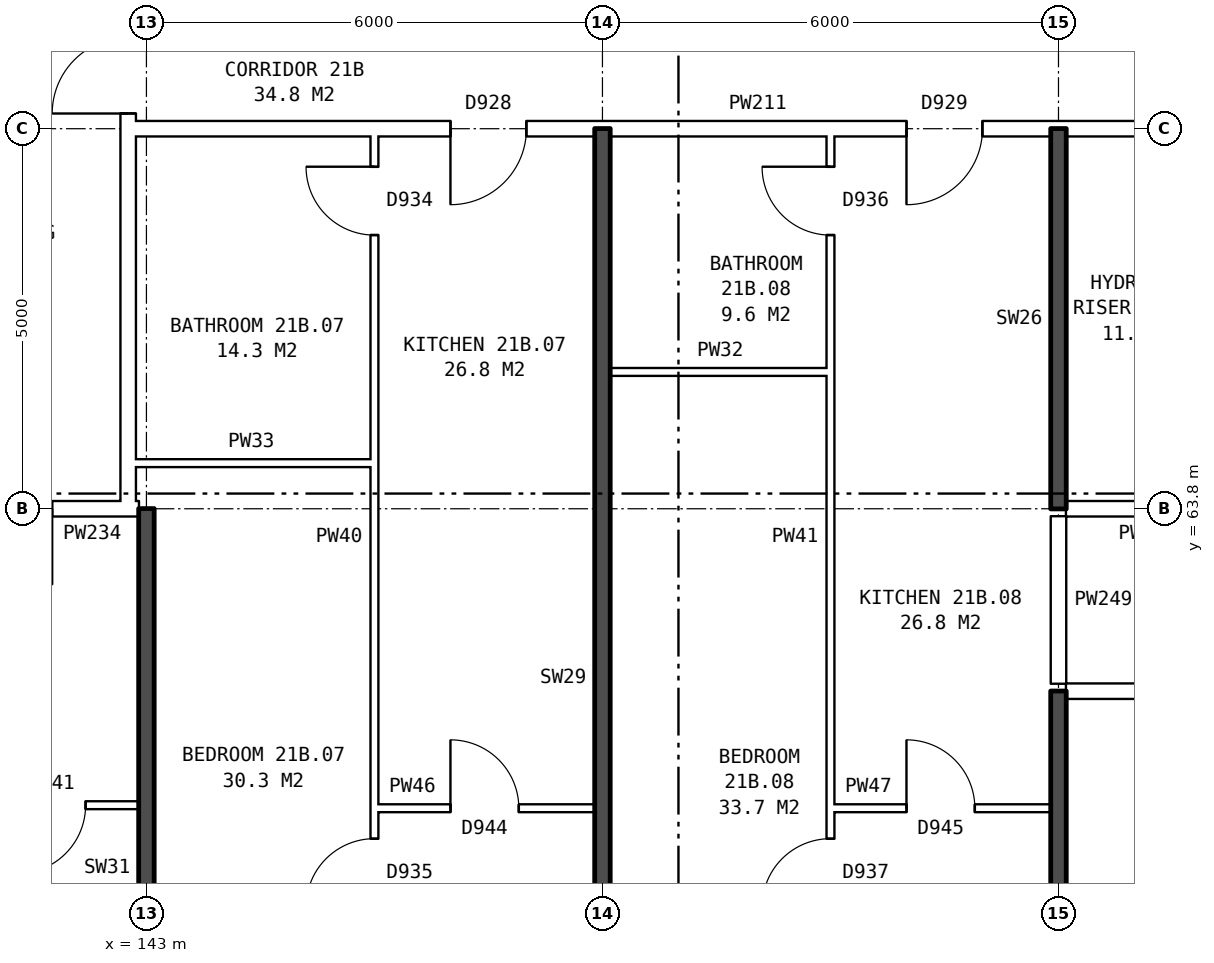
"""IFC4 building model, lengths in metres.
Left out: names, types, materials, properties, quantities, classifications, styles, units other than length and angle.
Written with IfcOpenShell. Run it as: python <this file> out.ifc"""

import sys

from ifc_helpers import new_model, si_unit, direction, frame, frame_2d, origin, place, context, subcontext, project, spatial, rectangle, extrude, element, fill, save


model = new_model("IFC4")
c1 = context("Model", 3, precision=1e-05, world=origin(), true_north=direction((0.0, 1.0)))
c2 = subcontext(c1, "Body", "Model", "MODEL_VIEW")
j1 = project(units=[si_unit("LENGTHUNIT", "METRE"), si_unit("PLANEANGLEUNIT", "RADIAN")], contexts=[c1])
p1 = place(None, origin())
s1 = spatial("IfcSite", under=j1, at=p1, CompositionType="ELEMENT")
p2 = place(p1, origin())
s2 = spatial("IfcBuilding", under=s1, at=p2, CompositionType="ELEMENT")
p3 = place(p2, frame((0.0, 0.0, 77.8)))
s3 = spatial("IfcBuildingStorey", under=s2, at=p3, CompositionType="ELEMENT", Elevation=77.8)
p4 = place(p3, frame((142.76, 63.9, 0.0), z_axis=(0.0, 0.0, 1.0), x_axis=(0.0, 1.0, 0.0)))
e1 = element("IfcWall", 1, at=p4, inside=s3, PredefinedType="PARTITIONING", context=c2, shape_type="SweptSolid", body=[
    extrude(rectangle(XDim=12.2, YDim=0.2, at=frame_2d((6.1, 0.0))), origin(), (0.0, 0.0, 1.0), 2.85),
])
p5 = place(p4, frame((5.1, 0.0, 0.0)))
e2 = element("IfcOpeningElement", 2, at=p5, cuts=e1, PredefinedType="OPENING", context=c2, shape_type="SweptSolid", body=[
    extrude(rectangle(XDim=2.0, YDim=2.1, at=frame_2d((1.0, 1.05))), frame((0.0, 0.11, 0.0), z_axis=(0.0, -1.0, 0.0), x_axis=(1.0, 0.0, 0.0)), (0.0, 0.0, 1.0), 0.22),
])
p6 = place(p3, frame((146.0, 59.86, 0.0), z_axis=(0.0, 0.0, 1.0), x_axis=(1.0, 0.0, 0.0)))
e3 = element("IfcWall", 3, at=p6, inside=s3, PredefinedType="PARTITIONING", context=c2, shape_type="SweptSolid", body=[
    extrude(rectangle(XDim=2.9, YDim=0.1, at=frame_2d((1.45, 0.0))), origin(), (0.0, 0.0, 1.0), 2.85),
])
p7 = place(p6, frame((1.0, 0.0, 0.0)))
e4 = element("IfcOpeningElement", 4, at=p7, cuts=e3, PredefinedType="OPENING", context=c2, shape_type="SweptSolid", body=[
    extrude(rectangle(XDim=0.9, YDim=2.1, at=frame_2d((0.45, 1.05))), frame((0.0, 0.06, 0.0), z_axis=(0.0, -1.0, 0.0), x_axis=(1.0, 0.0, 0.0)), (0.0, 0.0, 1.0), 0.12),
])
p8 = place(p3, frame((152.0, 59.86, 0.0), z_axis=(0.0, 0.0, 1.0), x_axis=(1.0, 0.0, 0.0)))
e5 = element("IfcWall", 5, at=p8, inside=s3, PredefinedType="PARTITIONING", context=c2, shape_type="SweptSolid", body=[
    extrude(rectangle(XDim=2.9, YDim=0.1, at=frame_2d((1.45, 0.0))), origin(), (0.0, 0.0, 1.0), 2.85),
])
p9 = place(p8, frame((1.0, 0.0, 0.0)))
e6 = element("IfcOpeningElement", 6, at=p9, cuts=e5, PredefinedType="OPENING", context=c2, shape_type="SweptSolid", body=[
    extrude(rectangle(XDim=0.9, YDim=2.1, at=frame_2d((0.45, 1.05))), frame((0.0, 0.06, 0.0), z_axis=(0.0, -1.0, 0.0), x_axis=(1.0, 0.0, 0.0)), (0.0, 0.0, 1.0), 0.12),
])
p10 = place(p3, frame((137.1, 59.9, 0.0), z_axis=(0.0, 0.0, 1.0), x_axis=(1.0, 0.0, 0.0)))
e7 = element("IfcWall", 7, at=p10, inside=s3, PredefinedType="PARTITIONING", context=c2, shape_type="SweptSolid", body=[
    extrude(rectangle(XDim=5.8, YDim=0.1, at=frame_2d((2.9, 0.0))), origin(), (0.0, 0.0, 1.0), 2.85),
])
p11 = place(p10, frame((1.3, 0.0, 0.0)))
e8 = element("IfcOpeningElement", 8, at=p11, cuts=e7, PredefinedType="OPENING", context=c2, shape_type="SweptSolid", body=[
    extrude(rectangle(XDim=0.9, YDim=2.1, at=frame_2d((0.45, 1.05))), frame((0.0, 0.06, 0.0), z_axis=(0.0, -1.0, 0.0), x_axis=(1.0, 0.0, 0.0)), (0.0, 0.0, 1.0), 0.12),
])
p12 = place(p10, frame((4.2, 0.0, 0.0)))
e9 = element("IfcOpeningElement", 9, at=p12, cuts=e7, PredefinedType="OPENING", context=c2, shape_type="SweptSolid", body=[
    extrude(rectangle(XDim=0.9, YDim=2.1, at=frame_2d((0.45, 1.05))), frame((0.0, 0.06, 0.0), z_axis=(0.0, -1.0, 0.0), x_axis=(1.0, 0.0, 0.0)), (0.0, 0.0, 1.0), 0.12),
])
p13 = place(p3, frame((155.1, 61.4, 0.0), z_axis=(0.0, 0.0, 1.0), x_axis=(1.0, 0.0, 0.0)))
e10 = element("IfcWall", 10, at=p13, inside=s3, PredefinedType="PARTITIONING", context=c2, shape_type="SweptSolid", body=[
    extrude(rectangle(XDim=19.79, YDim=0.2, at=frame_2d((9.895, 0.0))), origin(), (0.0, 0.0, 1.0), 2.85),
])
p14 = place(p13, frame((1.45, 0.0, 0.0)))
e11 = element("IfcOpeningElement", 11, at=p14, cuts=e10, PredefinedType="OPENING", context=c2, shape_type="SweptSolid", body=[
    extrude(rectangle(XDim=1.0, YDim=2.1, at=frame_2d((0.5, 1.05))), frame((0.0, 0.11, 0.0), z_axis=(0.0, -1.0, 0.0), x_axis=(1.0, 0.0, 0.0)), (0.0, 0.0, 1.0), 0.22),
])
p15 = place(p13, frame((7.4, 0.0, 0.0)))
e12 = element("IfcOpeningElement", 12, at=p15, cuts=e10, PredefinedType="OPENING", context=c2, shape_type="SweptSolid", body=[
    extrude(rectangle(XDim=1.0, YDim=2.1, at=frame_2d((0.5, 1.05))), frame((0.0, 0.11, 0.0), z_axis=(0.0, -1.0, 0.0), x_axis=(1.0, 0.0, 0.0)), (0.0, 0.0, 1.0), 0.22),
])
p16 = place(p13, frame((13.2, 0.0, 0.0)))
e13 = element("IfcOpeningElement", 13, at=p16, cuts=e10, PredefinedType="OPENING", context=c2, shape_type="SweptSolid", body=[
    extrude(rectangle(XDim=1.0, YDim=2.1, at=frame_2d((0.5, 1.05))), frame((0.0, 0.11, 0.0), z_axis=(0.0, -1.0, 0.0), x_axis=(1.0, 0.0, 0.0)), (0.0, 0.0, 1.0), 0.22),
])
p17 = place(p3, frame((139.76, 63.8, 0.0), z_axis=(0.0, 0.0, 1.0), x_axis=(1.0, 0.0, 0.0)))
e14 = element("IfcWall", 14, at=p17, inside=s3, PredefinedType="PARTITIONING", context=c2, shape_type="SweptSolid", body=[
    extrude(rectangle(XDim=3.0, YDim=0.2, at=frame_2d((1.5, 0.0))), origin(), (0.0, 0.0, 1.0), 2.85),
])
p18 = place(p17, frame((1.0, 0.0, 0.0)))
e15 = element("IfcOpeningElement", 15, at=p18, cuts=e14, PredefinedType="OPENING", context=c2, shape_type="SweptSolid", body=[
    extrude(rectangle(XDim=1.0, YDim=2.1, at=frame_2d((0.5, 1.05))), frame((0.0, 0.11, 0.0), z_axis=(0.0, -1.0, 0.0), x_axis=(1.0, 0.0, 0.0)), (0.0, 0.0, 1.0), 0.22),
])
p19 = place(p3, frame((142.76, 63.8, 0.0), z_axis=(0.0, 0.0, 1.0), x_axis=(1.0, 0.0, 0.0)))
e16 = element("IfcWall", 16, at=p19, inside=s3, PredefinedType="PARTITIONING", context=c2, shape_type="SweptSolid", body=[
    extrude(rectangle(XDim=0.14, YDim=0.2, at=frame_2d((0.07, 0.0))), origin(), (0.0, 0.0, 1.0), 2.85),
])
p20 = place(p3, frame((155.1, 63.8, 0.0), z_axis=(0.0, 0.0, 1.0), x_axis=(1.0, 0.0, 0.0)))
e17 = element("IfcWall", 17, at=p20, inside=s3, PredefinedType="PARTITIONING", context=c2, shape_type="SweptSolid", body=[
    extrude(rectangle(XDim=2.14, YDim=0.2, at=frame_2d((1.07, 0.0))), origin(), (0.0, 0.0, 1.0), 2.85),
])
p21 = place(p3, frame((142.76, 64.4, 0.0), z_axis=(0.0, 0.0, 1.0), x_axis=(1.0, 0.0, 0.0)))
e18 = element("IfcWall", 18, at=p21, inside=s3, PredefinedType="PARTITIONING", context=c2, shape_type="SweptSolid", body=[
    extrude(rectangle(XDim=3.24, YDim=0.1, at=frame_2d((1.62, 0.0))), origin(), (0.0, 0.0, 1.0), 2.85),
])
p22 = place(p3, frame((149.1, 65.6, 0.0), z_axis=(0.0, 0.0, 1.0), x_axis=(1.0, 0.0, 0.0)))
e19 = element("IfcWall", 19, at=p22, inside=s3, PredefinedType="PARTITIONING", context=c2, shape_type="SweptSolid", body=[
    extrude(rectangle(XDim=2.9, YDim=0.1, at=frame_2d((1.45, 0.0))), origin(), (0.0, 0.0, 1.0), 2.85),
])
p23 = place(p3, frame((142.76, 68.8, 0.0), z_axis=(0.0, 0.0, 1.0), x_axis=(1.0, 0.0, 0.0)))
e20 = element("IfcWall", 20, at=p23, inside=s3, PredefinedType="PARTITIONING", context=c2, shape_type="SweptSolid", body=[
    extrude(rectangle(XDim=14.48, YDim=0.2, at=frame_2d((7.24, 0.0))), origin(), (0.0, 0.0, 1.0), 2.85),
])
p24 = place(p23, frame((4.24, 0.0, 0.0)))
e21 = element("IfcOpeningElement", 21, at=p24, cuts=e20, PredefinedType="OPENING", context=c2, shape_type="SweptSolid", body=[
    extrude(rectangle(XDim=1.0, YDim=2.1, at=frame_2d((0.5, 1.05))), frame((0.0, 0.11, 0.0), z_axis=(0.0, -1.0, 0.0), x_axis=(1.0, 0.0, 0.0)), (0.0, 0.0, 1.0), 0.22),
])
p25 = place(p23, frame((10.24, 0.0, 0.0)))
e22 = element("IfcOpeningElement", 22, at=p25, cuts=e20, PredefinedType="OPENING", context=c2, shape_type="SweptSolid", body=[
    extrude(rectangle(XDim=1.0, YDim=2.1, at=frame_2d((0.5, 1.05))), frame((0.0, 0.11, 0.0), z_axis=(0.0, -1.0, 0.0), x_axis=(1.0, 0.0, 0.0)), (0.0, 0.0, 1.0), 0.22),
])
p26 = place(p3, frame((143.0, 54.36, 0.0), z_axis=(0.0, 0.0, 1.0), x_axis=(0.0, 1.0, 0.0)))
e23 = element("IfcWall", 23, at=p26, inside=s3, PredefinedType="SOLIDWALL", context=c2, shape_type="SweptSolid", body=[
    extrude(rectangle(XDim=9.44, YDim=0.2, at=frame_2d((4.72, 0.0))), origin(), (0.0, 0.0, 1.0), 2.85),
])
p27 = place(p3, frame((146.0, 54.36, 0.0), z_axis=(0.0, 0.0, 1.0), x_axis=(0.0, 1.0, 0.0)))
e24 = element("IfcWall", 24, at=p27, inside=s3, PredefinedType="PARTITIONING", context=c2, shape_type="SweptSolid", body=[
    extrude(rectangle(XDim=14.34, YDim=0.1, at=frame_2d((7.17, 0.0))), origin(), (0.0, 0.0, 1.0), 2.85),
])
p28 = place(p27, frame((4.2, 0.0, 0.0)))
e25 = element("IfcOpeningElement", 25, at=p28, cuts=e24, PredefinedType="OPENING", context=c2, shape_type="SweptSolid", body=[
    extrude(rectangle(XDim=0.9, YDim=2.1, at=frame_2d((0.45, 1.05))), frame((0.0, 0.06, 0.0), z_axis=(0.0, -1.0, 0.0), x_axis=(1.0, 0.0, 0.0)), (0.0, 0.0, 1.0), 0.12),
])
p29 = place(p27, frame((13.04, 0.0, 0.0)))
e26 = element("IfcOpeningElement", 26, at=p29, cuts=e24, PredefinedType="OPENING", context=c2, shape_type="SweptSolid", body=[
    extrude(rectangle(XDim=0.9, YDim=2.1, at=frame_2d((0.45, 1.05))), frame((0.0, 0.06, 0.0), z_axis=(0.0, -1.0, 0.0), x_axis=(1.0, 0.0, 0.0)), (0.0, 0.0, 1.0), 0.12),
])
p30 = place(p3, frame((149.0, 54.36, 0.0), z_axis=(0.0, 0.0, 1.0), x_axis=(0.0, 1.0, 0.0)))
e27 = element("IfcWall", 27, at=p30, inside=s3, PredefinedType="SOLIDWALL", context=c2, shape_type="SweptSolid", body=[
    extrude(rectangle(XDim=14.44, YDim=0.2, at=frame_2d((7.22, 0.0))), origin(), (0.0, 0.0, 1.0), 2.85),
])
p31 = place(p3, frame((152.0, 54.36, 0.0), z_axis=(0.0, 0.0, 1.0), x_axis=(0.0, 1.0, 0.0)))
e28 = element("IfcWall", 28, at=p31, inside=s3, PredefinedType="PARTITIONING", context=c2, shape_type="SweptSolid", body=[
    extrude(rectangle(XDim=14.34, YDim=0.1, at=frame_2d((7.17, 0.0))), origin(), (0.0, 0.0, 1.0), 2.85),
])
p32 = place(p31, frame((4.2, 0.0, 0.0)))
e29 = element("IfcOpeningElement", 29, at=p32, cuts=e28, PredefinedType="OPENING", context=c2, shape_type="SweptSolid", body=[
    extrude(rectangle(XDim=0.9, YDim=2.1, at=frame_2d((0.45, 1.05))), frame((0.0, 0.06, 0.0), z_axis=(0.0, -1.0, 0.0), x_axis=(1.0, 0.0, 0.0)), (0.0, 0.0, 1.0), 0.12),
])
p33 = place(p31, frame((13.04, 0.0, 0.0)))
e30 = element("IfcOpeningElement", 30, at=p33, cuts=e28, PredefinedType="OPENING", context=c2, shape_type="SweptSolid", body=[
    extrude(rectangle(XDim=0.9, YDim=2.1, at=frame_2d((0.45, 1.05))), frame((0.0, 0.06, 0.0), z_axis=(0.0, -1.0, 0.0), x_axis=(1.0, 0.0, 0.0)), (0.0, 0.0, 1.0), 0.12),
])
p34 = place(p3, frame((155.0, 54.36, 0.0), z_axis=(0.0, 0.0, 1.0), x_axis=(0.0, 1.0, 0.0)))
e31 = element("IfcWall", 31, at=p34, inside=s3, PredefinedType="SOLIDWALL", context=c2, shape_type="SweptSolid", body=[
    extrude(rectangle(XDim=7.04, YDim=0.2, at=frame_2d((3.52, 0.0))), origin(), (0.0, 0.0, 1.0), 2.85),
])
p35 = place(p3, frame((155.0, 61.5, 0.0), z_axis=(0.0, 0.0, 1.0), x_axis=(0.0, 1.0, 0.0)))
e32 = element("IfcWall", 32, at=p35, inside=s3, PredefinedType="PARTITIONING", context=c2, shape_type="SweptSolid", body=[
    extrude(rectangle(XDim=2.2, YDim=0.2, at=frame_2d((1.1, 0.0))), origin(), (0.0, 0.0, 1.0), 2.85),
])
p36 = place(p3, frame((155.0, 63.8, 0.0), z_axis=(0.0, 0.0, 1.0), x_axis=(0.0, 1.0, 0.0)))
e33 = element("IfcWall", 33, at=p36, inside=s3, PredefinedType="SOLIDWALL", context=c2, shape_type="SweptSolid", body=[
    extrude(rectangle(XDim=5.0, YDim=0.2, at=frame_2d((2.5, 0.0))), origin(), (0.0, 0.0, 1.0), 2.85),
])
p37 = place(p5, origin())
e34 = element("IfcDoor", 34, at=p37, inside=s3, OperationType="DOUBLE_DOOR_SINGLE_SWING", PredefinedType="DOOR", context=c2, shape_type="SweptSolid", body=[
    extrude(rectangle(XDim=2.0, YDim=2.1, at=frame_2d((1.0, 1.05))), frame((0.0, 0.025, 0.0), z_axis=(0.0, -1.0, 0.0), x_axis=(1.0, 0.0, 0.0)), (0.0, 0.0, 1.0), 0.05),
])
fill(e2, e34)
p38 = place(p12, frame((0.9, 0.0, 0.0), z_axis=(0.0, 0.0, 1.0), x_axis=(-1.0, 0.0, 0.0)))
e35 = element("IfcDoor", 35, at=p38, inside=s3, OperationType="SINGLE_SWING_RIGHT", PredefinedType="DOOR", context=c2, shape_type="SweptSolid", body=[
    extrude(rectangle(XDim=0.9, YDim=2.1, at=frame_2d((0.45, 1.05))), frame((0.0, 0.025, 0.0), z_axis=(0.0, -1.0, 0.0), x_axis=(1.0, 0.0, 0.0)), (0.0, 0.0, 1.0), 0.05),
])
fill(e9, e35)
p39 = place(p28, origin())
e36 = element("IfcDoor", 36, at=p39, inside=s3, OperationType="SINGLE_SWING_LEFT", PredefinedType="DOOR", context=c2, shape_type="SweptSolid", body=[
    extrude(rectangle(XDim=0.9, YDim=2.1, at=frame_2d((0.45, 1.05))), frame((0.0, 0.025, 0.0), z_axis=(0.0, -1.0, 0.0), x_axis=(1.0, 0.0, 0.0)), (0.0, 0.0, 1.0), 0.05),
])
fill(e25, e36)
p40 = place(p24, frame((1.0, 0.0, 0.0), z_axis=(0.0, 0.0, 1.0), x_axis=(-1.0, 0.0, 0.0)))
e37 = element("IfcDoor", 37, at=p40, inside=s3, OperationType="SINGLE_SWING_RIGHT", PredefinedType="DOOR", context=c2, shape_type="SweptSolid", body=[
    extrude(rectangle(XDim=1.0, YDim=2.1, at=frame_2d((0.5, 1.05))), frame((0.0, 0.025, 0.0), z_axis=(0.0, -1.0, 0.0), x_axis=(1.0, 0.0, 0.0)), (0.0, 0.0, 1.0), 0.05),
])
fill(e21, e37)
p41 = place(p7, origin())
e38 = element("IfcDoor", 38, at=p41, inside=s3, OperationType="SINGLE_SWING_LEFT", PredefinedType="DOOR", context=c2, shape_type="SweptSolid", body=[
    extrude(rectangle(XDim=0.9, YDim=2.1, at=frame_2d((0.45, 1.05))), frame((0.0, 0.025, 0.0), z_axis=(0.0, -1.0, 0.0), x_axis=(1.0, 0.0, 0.0)), (0.0, 0.0, 1.0), 0.05),
])
fill(e4, e38)
p42 = place(p29, origin())
e39 = element("IfcDoor", 39, at=p42, inside=s3, OperationType="SINGLE_SWING_RIGHT", PredefinedType="DOOR", context=c2, shape_type="SweptSolid", body=[
    extrude(rectangle(XDim=0.9, YDim=2.1, at=frame_2d((0.45, 1.05))), frame((0.0, 0.025, 0.0), z_axis=(0.0, -1.0, 0.0), x_axis=(1.0, 0.0, 0.0)), (0.0, 0.0, 1.0), 0.05),
])
fill(e26, e39)
p43 = place(p32, origin())
e40 = element("IfcDoor", 40, at=p43, inside=s3, OperationType="SINGLE_SWING_LEFT", PredefinedType="DOOR", context=c2, shape_type="SweptSolid", body=[
    extrude(rectangle(XDim=0.9, YDim=2.1, at=frame_2d((0.45, 1.05))), frame((0.0, 0.025, 0.0), z_axis=(0.0, -1.0, 0.0), x_axis=(1.0, 0.0, 0.0)), (0.0, 0.0, 1.0), 0.05),
])
fill(e29, e40)
p44 = place(p25, frame((1.0, 0.0, 0.0), z_axis=(0.0, 0.0, 1.0), x_axis=(-1.0, 0.0, 0.0)))
e41 = element("IfcDoor", 41, at=p44, inside=s3, OperationType="SINGLE_SWING_RIGHT", PredefinedType="DOOR", context=c2, shape_type="SweptSolid", body=[
    extrude(rectangle(XDim=1.0, YDim=2.1, at=frame_2d((0.5, 1.05))), frame((0.0, 0.025, 0.0), z_axis=(0.0, -1.0, 0.0), x_axis=(1.0, 0.0, 0.0)), (0.0, 0.0, 1.0), 0.05),
])
fill(e22, e41)
p45 = place(p9, origin())
e42 = element("IfcDoor", 42, at=p45, inside=s3, OperationType="SINGLE_SWING_LEFT", PredefinedType="DOOR", context=c2, shape_type="SweptSolid", body=[
    extrude(rectangle(XDim=0.9, YDim=2.1, at=frame_2d((0.45, 1.05))), frame((0.0, 0.025, 0.0), z_axis=(0.0, -1.0, 0.0), x_axis=(1.0, 0.0, 0.0)), (0.0, 0.0, 1.0), 0.05),
])
fill(e6, e42)
p46 = place(p33, origin())
e43 = element("IfcDoor", 43, at=p46, inside=s3, OperationType="SINGLE_SWING_RIGHT", PredefinedType="DOOR", context=c2, shape_type="SweptSolid", body=[
    extrude(rectangle(XDim=0.9, YDim=2.1, at=frame_2d((0.45, 1.05))), frame((0.0, 0.025, 0.0), z_axis=(0.0, -1.0, 0.0), x_axis=(1.0, 0.0, 0.0)), (0.0, 0.0, 1.0), 0.05),
])
fill(e30, e43)
save(model, sys.argv[1])
